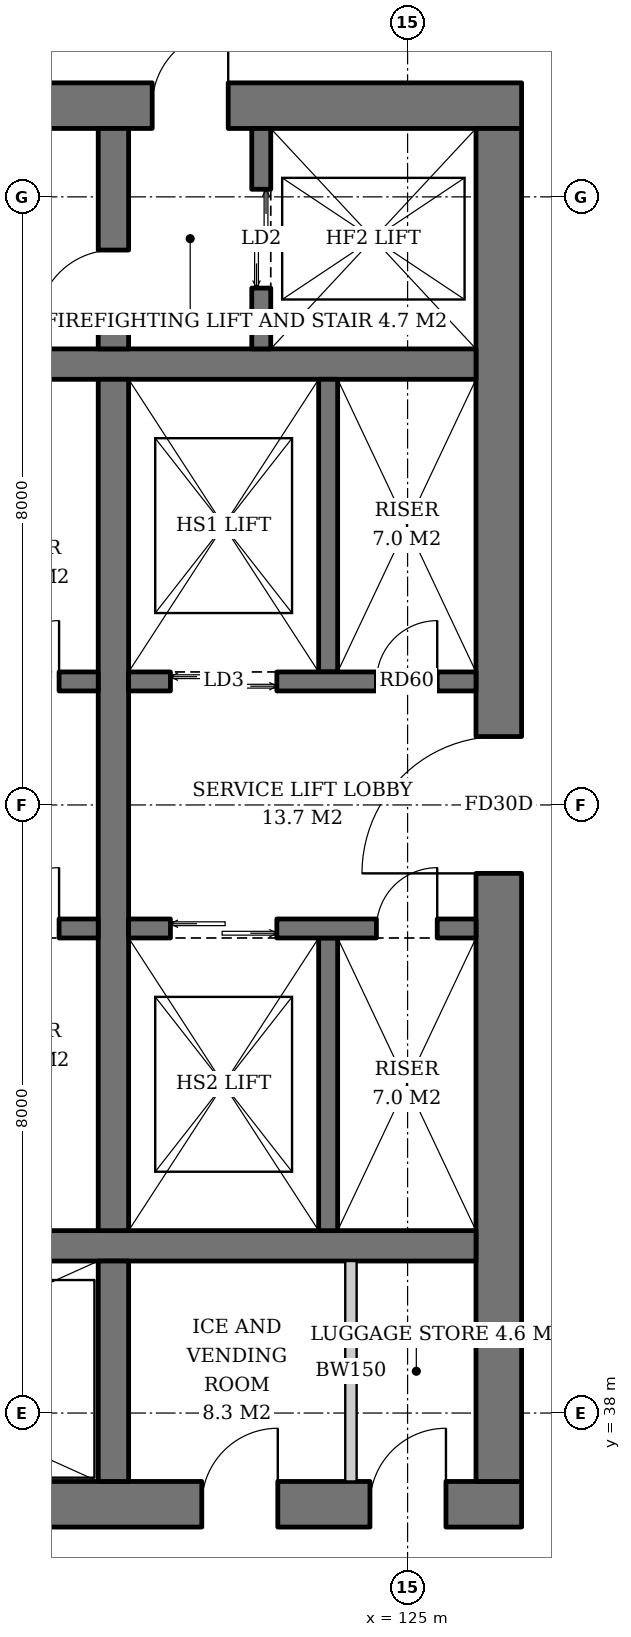
"""IFC4 building model, lengths in metres.
Left out: names, types, materials, properties, quantities, classifications, styles, units other than length and angle.
Written with IfcOpenShell. Run it as: python <this file> out.ifc"""

import sys

from ifc_helpers import new_model, si_unit, direction, frame, frame_2d, origin, place, context, subcontext, project, spatial, rectangle, extrude, element, fill, save


model = new_model("IFC4")
c1 = context("Model", 3, precision=1e-05, world=origin(), true_north=direction((0.0, 1.0)))
c2 = subcontext(c1, "Body", "Model", "MODEL_VIEW")
j1 = project(units=[si_unit("LENGTHUNIT", "METRE"), si_unit("PLANEANGLEUNIT", "RADIAN")], contexts=[c1])
p1 = place(None, origin())
s1 = spatial("IfcSite", under=j1, at=p1, CompositionType="ELEMENT")
p2 = place(p1, origin())
s2 = spatial("IfcBuilding", under=s1, at=p2, CompositionType="ELEMENT")
p3 = place(p2, frame((0.0, 0.0, 43.8)))
s3 = spatial("IfcBuildingStorey", under=s2, at=p3, CompositionType="ELEMENT", Elevation=43.8)
p4 = place(p3, frame((107.5, 36.8, 0.0), z_axis=(0.0, 0.0, 1.0), x_axis=(1.0, 0.0, 0.0)))
e1 = element("IfcWall", 1, at=p4, inside=s3, PredefinedType="SHEAR", context=c2, shape_type="SweptSolid", body=[
    extrude(rectangle(XDim=19.0, YDim=0.6, at=frame_2d((9.5, 0.0))), origin(), (0.0, 0.0, 1.0), 3.8),
])
p5 = place(p4, frame((3.9, 0.0, 0.0)))
e2 = element("IfcOpeningElement", 2, at=p5, cuts=e1, PredefinedType="OPENING", context=c2, shape_type="SweptSolid", body=[
    extrude(rectangle(XDim=1.0, YDim=2.1, at=frame_2d((0.5, 1.05))), frame((0.0, 0.31, 0.0), z_axis=(0.0, -1.0, 0.0), x_axis=(1.0, 0.0, 0.0)), (0.0, 0.0, 1.0), 0.62),
])
p6 = place(p4, frame((14.792, 0.0, 0.0)))
e3 = element("IfcOpeningElement", 3, at=p6, cuts=e1, PredefinedType="OPENING", context=c2, shape_type="SweptSolid", body=[
    extrude(rectangle(XDim=1.0, YDim=2.1, at=frame_2d((0.5, 1.05))), frame((0.0, 0.31, 0.0), z_axis=(0.0, -1.0, 0.0), x_axis=(1.0, 0.0, 0.0)), (0.0, 0.0, 1.0), 0.62),
])
p7 = place(p4, frame((17.005, 0.0, 0.0)))
e4 = element("IfcOpeningElement", 4, at=p7, cuts=e1, PredefinedType="OPENING", context=c2, shape_type="SweptSolid", body=[
    extrude(rectangle(XDim=1.0, YDim=2.1, at=frame_2d((0.5, 1.05))), frame((0.0, 0.31, 0.0), z_axis=(0.0, -1.0, 0.0), x_axis=(1.0, 0.0, 0.0)), (0.0, 0.0, 1.0), 0.62),
])
p8 = place(p3, frame((107.5, 55.2, 0.0), z_axis=(0.0, 0.0, 1.0), x_axis=(1.0, 0.0, 0.0)))
e5 = element("IfcWall", 5, at=p8, inside=s3, PredefinedType="SHEAR", context=c2, shape_type="SweptSolid", body=[
    extrude(rectangle(XDim=19.0, YDim=0.6, at=frame_2d((9.5, 0.0))), origin(), (0.0, 0.0, 1.0), 3.8),
])
p9 = place(p8, frame((14.14, 0.0, 0.0)))
e6 = element("IfcOpeningElement", 6, at=p9, cuts=e5, PredefinedType="OPENING", context=c2, shape_type="SweptSolid", body=[
    extrude(rectangle(XDim=1.0, YDim=2.1, at=frame_2d((0.5, 1.05))), frame((0.0, 0.31, 0.0), z_axis=(0.0, -1.0, 0.0), x_axis=(1.0, 0.0, 0.0)), (0.0, 0.0, 1.0), 0.62),
])
p10 = place(p8, frame((2.425, 0.0, 0.0)))
e7 = element("IfcOpeningElement", 7, at=p10, cuts=e5, PredefinedType="OPENING", context=c2, shape_type="SweptSolid", body=[
    extrude(rectangle(XDim=1.0, YDim=2.1, at=frame_2d((0.5, 1.05))), frame((0.0, 0.31, 0.0), z_axis=(0.0, -1.0, 0.0), x_axis=(1.0, 0.0, 0.0)), (0.0, 0.0, 1.0), 0.62),
])
p11 = place(p3, frame((126.2, 37.1, 0.0), z_axis=(0.0, 0.0, 1.0), x_axis=(0.0, 1.0, 0.0)))
e8 = element("IfcWall", 8, at=p11, inside=s3, PredefinedType="SHEAR", context=c2, shape_type="SweptSolid", body=[
    extrude(rectangle(XDim=17.8, YDim=0.6, at=frame_2d((8.9, 0.0))), origin(), (0.0, 0.0, 1.0), 3.8),
])
p12 = place(p11, frame((8.0, 0.0, 0.0)))
e9 = element("IfcOpeningElement", 9, at=p12, cuts=e8, PredefinedType="OPENING", context=c2, shape_type="SweptSolid", body=[
    extrude(rectangle(XDim=1.8, YDim=2.4, at=frame_2d((0.9, 1.2))), frame((0.0, 0.31, 0.0), z_axis=(0.0, -1.0, 0.0), x_axis=(1.0, 0.0, 0.0)), (0.0, 0.0, 1.0), 0.62),
])
for number, where, z_axis, x_axis in (
    (10, (108.1, 40.2, 0.0), (0.0, 0.0, 1.0), (1.0, 0.0, 0.0)),
    (11, (108.1, 51.8, 0.0), (0.0, 0.0, 1.0), (1.0, 0.0, 0.0)),
):
    element("IfcWall", number, at=place(p3, frame(where, z_axis=z_axis, x_axis=x_axis)), inside=s3, PredefinedType="SHEAR", context=c2, shape_type="SweptSolid", body=[
        extrude(rectangle(XDim=17.8, YDim=0.4, at=frame_2d((8.9, 0.0))), origin(), (0.0, 0.0, 1.0), 3.8),
    ])
p13 = place(p3, frame((121.13, 37.1, 0.0), z_axis=(0.0, 0.0, 1.0), x_axis=(0.0, 1.0, 0.0)))
e12 = element("IfcWall", 12, at=p13, inside=s3, PredefinedType="SHEAR", context=c2, shape_type="SweptSolid", body=[
    extrude(rectangle(XDim=2.9, YDim=0.4, at=frame_2d((1.45, 0.0))), origin(), (0.0, 0.0, 1.0), 3.8),
])
p14 = place(p3, frame((121.13, 40.4, 0.0), z_axis=(0.0, 0.0, 1.0), x_axis=(0.0, 1.0, 0.0)))
e13 = element("IfcWall", 13, at=p14, inside=s3, PredefinedType="SHEAR", context=c2, shape_type="SweptSolid", body=[
    extrude(rectangle(XDim=11.2, YDim=0.4, at=frame_2d((5.6, 0.0))), origin(), (0.0, 0.0, 1.0), 3.8),
])
p15 = place(p3, frame((121.13, 52.0, 0.0), z_axis=(0.0, 0.0, 1.0), x_axis=(0.0, 1.0, 0.0)))
e14 = element("IfcWall", 14, at=p15, inside=s3, PredefinedType="SHEAR", context=c2, shape_type="SweptSolid", body=[
    extrude(rectangle(XDim=2.9, YDim=0.4, at=frame_2d((1.45, 0.0))), origin(), (0.0, 0.0, 1.0), 3.8),
])
p16 = place(p15, frame((0.3, 0.0, 0.0)))
e15 = element("IfcOpeningElement", 15, at=p16, cuts=e14, PredefinedType="OPENING", context=c2, shape_type="SweptSolid", body=[
    extrude(rectangle(XDim=1.0, YDim=2.1, at=frame_2d((0.5, 1.05))), frame((0.0, 0.21, 0.0), z_axis=(0.0, -1.0, 0.0), x_axis=(1.0, 0.0, 0.0)), (0.0, 0.0, 1.0), 0.42),
])
p17 = place(p3, frame((123.075, 52.0, 0.0), z_axis=(0.0, 0.0, 1.0), x_axis=(0.0, 1.0, 0.0)))
e16 = element("IfcWall", 16, at=p17, inside=s3, PredefinedType="SHEAR", context=c2, shape_type="SweptSolid", body=[
    extrude(rectangle(XDim=2.9, YDim=0.25, at=frame_2d((1.45, 0.0))), origin(), (0.0, 0.0, 1.0), 3.8),
])
p18 = place(p17, frame((0.8, 0.0, 0.0)))
e17 = element("IfcOpeningElement", 17, at=p18, cuts=e16, PredefinedType="OPENING", context=c2, shape_type="SweptSolid", body=[
    extrude(rectangle(XDim=1.3, YDim=2.2, at=frame_2d((0.65, 1.1))), frame((0.0, 0.135, 0.0), z_axis=(0.0, -1.0, 0.0), x_axis=(1.0, 0.0, 0.0)), (0.0, 0.0, 1.0), 0.27),
])
p19 = place(p3, frame((108.1, 47.625, 0.0), z_axis=(0.0, 0.0, 1.0), x_axis=(1.0, 0.0, 0.0)))
e18 = element("IfcWall", 18, at=p19, inside=s3, PredefinedType="SHEAR", context=c2, shape_type="SweptSolid", body=[
    extrude(rectangle(XDim=12.83, YDim=0.25, at=frame_2d((6.415, 0.0))), origin(), (0.0, 0.0, 1.0), 3.8),
])
p20 = place(p19, frame((0.7, 0.0, 0.0)))
e19 = element("IfcOpeningElement", 19, at=p20, cuts=e18, PredefinedType="OPENING", context=c2, shape_type="SweptSolid", body=[
    extrude(rectangle(XDim=1.1, YDim=2.2, at=frame_2d((0.55, 1.1))), frame((0.0, 0.135, 0.0), z_axis=(0.0, -1.0, 0.0), x_axis=(1.0, 0.0, 0.0)), (0.0, 0.0, 1.0), 0.27),
])
p21 = place(p19, frame((3.45, 0.0, 0.0)))
e20 = element("IfcOpeningElement", 20, at=p21, cuts=e18, PredefinedType="OPENING", context=c2, shape_type="SweptSolid", body=[
    extrude(rectangle(XDim=1.1, YDim=2.2, at=frame_2d((0.55, 1.1))), frame((0.0, 0.135, 0.0), z_axis=(0.0, -1.0, 0.0), x_axis=(1.0, 0.0, 0.0)), (0.0, 0.0, 1.0), 0.27),
])
p22 = place(p19, frame((6.2, 0.0, 0.0)))
e21 = element("IfcOpeningElement", 21, at=p22, cuts=e18, PredefinedType="OPENING", context=c2, shape_type="SweptSolid", body=[
    extrude(rectangle(XDim=1.1, YDim=2.2, at=frame_2d((0.55, 1.1))), frame((0.0, 0.135, 0.0), z_axis=(0.0, -1.0, 0.0), x_axis=(1.0, 0.0, 0.0)), (0.0, 0.0, 1.0), 0.27),
])
p23 = place(p19, frame((8.95, 0.0, 0.0)))
e22 = element("IfcOpeningElement", 22, at=p23, cuts=e18, PredefinedType="OPENING", context=c2, shape_type="SweptSolid", body=[
    extrude(rectangle(XDim=1.1, YDim=2.2, at=frame_2d((0.55, 1.1))), frame((0.0, 0.135, 0.0), z_axis=(0.0, -1.0, 0.0), x_axis=(1.0, 0.0, 0.0)), (0.0, 0.0, 1.0), 0.27),
])
p24 = place(p19, frame((11.515, 0.0, 0.0)))
e23 = element("IfcOpeningElement", 23, at=p24, cuts=e18, PredefinedType="OPENING", context=c2, shape_type="SweptSolid", body=[
    extrude(rectangle(XDim=0.8, YDim=2.0, at=frame_2d((0.4, 1.0))), frame((0.0, 0.135, 0.0), z_axis=(0.0, -1.0, 0.0), x_axis=(1.0, 0.0, 0.0)), (0.0, 0.0, 1.0), 0.27),
])
p25 = place(p3, frame((108.1, 44.375, 0.0), z_axis=(0.0, 0.0, 1.0), x_axis=(1.0, 0.0, 0.0)))
e24 = element("IfcWall", 24, at=p25, inside=s3, PredefinedType="SHEAR", context=c2, shape_type="SweptSolid", body=[
    extrude(rectangle(XDim=12.83, YDim=0.25, at=frame_2d((6.415, 0.0))), origin(), (0.0, 0.0, 1.0), 3.8),
])
p26 = place(p25, frame((0.7, 0.0, 0.0)))
e25 = element("IfcOpeningElement", 25, at=p26, cuts=e24, PredefinedType="OPENING", context=c2, shape_type="SweptSolid", body=[
    extrude(rectangle(XDim=1.1, YDim=2.2, at=frame_2d((0.55, 1.1))), frame((0.0, 0.135, 0.0), z_axis=(0.0, -1.0, 0.0), x_axis=(1.0, 0.0, 0.0)), (0.0, 0.0, 1.0), 0.27),
])
p27 = place(p25, frame((3.45, 0.0, 0.0)))
e26 = element("IfcOpeningElement", 26, at=p27, cuts=e24, PredefinedType="OPENING", context=c2, shape_type="SweptSolid", body=[
    extrude(rectangle(XDim=1.1, YDim=2.2, at=frame_2d((0.55, 1.1))), frame((0.0, 0.135, 0.0), z_axis=(0.0, -1.0, 0.0), x_axis=(1.0, 0.0, 0.0)), (0.0, 0.0, 1.0), 0.27),
])
p28 = place(p25, frame((6.2, 0.0, 0.0)))
e27 = element("IfcOpeningElement", 27, at=p28, cuts=e24, PredefinedType="OPENING", context=c2, shape_type="SweptSolid", body=[
    extrude(rectangle(XDim=1.1, YDim=2.2, at=frame_2d((0.55, 1.1))), frame((0.0, 0.135, 0.0), z_axis=(0.0, -1.0, 0.0), x_axis=(1.0, 0.0, 0.0)), (0.0, 0.0, 1.0), 0.27),
])
p29 = place(p25, frame((9.0, 0.0, 0.0)))
e28 = element("IfcOpeningElement", 28, at=p29, cuts=e24, PredefinedType="OPENING", context=c2, shape_type="SweptSolid", body=[
    extrude(rectangle(XDim=1.0, YDim=2.1, at=frame_2d((0.5, 1.05))), frame((0.0, 0.135, 0.0), z_axis=(0.0, -1.0, 0.0), x_axis=(1.0, 0.0, 0.0)), (0.0, 0.0, 1.0), 0.27),
])
p30 = place(p25, frame((11.515, 0.0, 0.0)))
e29 = element("IfcOpeningElement", 29, at=p30, cuts=e24, PredefinedType="OPENING", context=c2, shape_type="SweptSolid", body=[
    extrude(rectangle(XDim=0.8, YDim=2.0, at=frame_2d((0.4, 1.0))), frame((0.0, 0.135, 0.0), z_axis=(0.0, -1.0, 0.0), x_axis=(1.0, 0.0, 0.0)), (0.0, 0.0, 1.0), 0.27),
])
p31 = place(p3, frame((123.955, 47.75, 0.0), z_axis=(0.0, 0.0, 1.0), x_axis=(0.0, 1.0, 0.0)))
e30 = element("IfcWall", 30, at=p31, inside=s3, PredefinedType="SHEAR", context=c2, shape_type="SweptSolid", body=[
    extrude(rectangle(XDim=3.85, YDim=0.25, at=frame_2d((1.925, 0.0))), origin(), (0.0, 0.0, 1.0), 3.8),
])
p32 = place(p3, frame((121.33, 47.625, 0.0), z_axis=(0.0, 0.0, 1.0), x_axis=(1.0, 0.0, 0.0)))
e31 = element("IfcWall", 31, at=p32, inside=s3, PredefinedType="SHEAR", context=c2, shape_type="SweptSolid", body=[
    extrude(rectangle(XDim=4.57, YDim=0.25, at=frame_2d((2.285, 0.0))), origin(), (0.0, 0.0, 1.0), 3.8),
])
p33 = place(p32, frame((0.55, 0.0, 0.0)))
e32 = element("IfcOpeningElement", 32, at=p33, cuts=e31, PredefinedType="OPENING", context=c2, shape_type="SweptSolid", body=[
    extrude(rectangle(XDim=1.4, YDim=2.4, at=frame_2d((0.7, 1.2))), frame((0.0, 0.135, 0.0), z_axis=(0.0, -1.0, 0.0), x_axis=(1.0, 0.0, 0.0)), (0.0, 0.0, 1.0), 0.27),
])
p34 = place(p32, frame((3.26, 0.0, 0.0)))
e33 = element("IfcOpeningElement", 33, at=p34, cuts=e31, PredefinedType="OPENING", context=c2, shape_type="SweptSolid", body=[
    extrude(rectangle(XDim=0.8, YDim=2.0, at=frame_2d((0.4, 1.0))), frame((0.0, 0.135, 0.0), z_axis=(0.0, -1.0, 0.0), x_axis=(1.0, 0.0, 0.0)), (0.0, 0.0, 1.0), 0.27),
])
p35 = place(p3, frame((123.955, 44.25, 0.0), z_axis=(0.0, 0.0, 1.0), x_axis=(0.0, -1.0, 0.0)))
e34 = element("IfcWall", 34, at=p35, inside=s3, PredefinedType="SHEAR", context=c2, shape_type="SweptSolid", body=[
    extrude(rectangle(XDim=3.85, YDim=0.25, at=frame_2d((1.925, 0.0))), origin(), (0.0, 0.0, 1.0), 3.8),
])
p36 = place(p3, frame((121.33, 44.375, 0.0), z_axis=(0.0, 0.0, 1.0), x_axis=(1.0, 0.0, 0.0)))
e35 = element("IfcWall", 35, at=p36, inside=s3, PredefinedType="SHEAR", context=c2, shape_type="SweptSolid", body=[
    extrude(rectangle(XDim=4.57, YDim=0.25, at=frame_2d((2.285, 0.0))), origin(), (0.0, 0.0, 1.0), 3.8),
])
p37 = place(p36, frame((0.55, 0.0, 0.0)))
e36 = element("IfcOpeningElement", 36, at=p37, cuts=e35, PredefinedType="OPENING", context=c2, shape_type="SweptSolid", body=[
    extrude(rectangle(XDim=1.4, YDim=2.4, at=frame_2d((0.7, 1.2))), frame((0.0, 0.135, 0.0), z_axis=(0.0, -1.0, 0.0), x_axis=(1.0, 0.0, 0.0)), (0.0, 0.0, 1.0), 0.27),
])
p38 = place(p36, frame((3.26, 0.0, 0.0)))
e37 = element("IfcOpeningElement", 37, at=p38, cuts=e35, PredefinedType="OPENING", context=c2, shape_type="SweptSolid", body=[
    extrude(rectangle(XDim=0.8, YDim=2.0, at=frame_2d((0.4, 1.0))), frame((0.0, 0.135, 0.0), z_axis=(0.0, -1.0, 0.0), x_axis=(1.0, 0.0, 0.0)), (0.0, 0.0, 1.0), 0.27),
])
p39 = place(p3, frame((124.255, 37.1, 0.0), z_axis=(0.0, 0.0, 1.0), x_axis=(0.0, 1.0, 0.0)))
e38 = element("IfcWall", 38, at=p39, inside=s3, PredefinedType="SOLIDWALL", context=c2, shape_type="SweptSolid", body=[
    extrude(rectangle(XDim=2.9, YDim=0.15, at=frame_2d((1.45, 0.0))), origin(), (0.0, 0.0, 1.0), 3.6),
])
p40 = place(p18, origin())
e39 = element("IfcDoor", 39, at=p40, inside=s3, OperationType="DOUBLE_DOOR_SLIDING", PredefinedType="DOOR", context=c2, shape_type="SweptSolid", body=[
    extrude(rectangle(XDim=1.3, YDim=2.2, at=frame_2d((0.65, 1.1))), frame((0.0, 0.025, 0.0), z_axis=(0.0, -1.0, 0.0), x_axis=(1.0, 0.0, 0.0)), (0.0, 0.0, 1.0), 0.05),
])
fill(e17, e39)
p41 = place(p24, origin())
e40 = element("IfcDoor", 40, at=p41, inside=s3, OperationType="SINGLE_SWING_RIGHT", PredefinedType="DOOR", context=c2, shape_type="SweptSolid", body=[
    extrude(rectangle(XDim=0.8, YDim=2.0, at=frame_2d((0.4, 1.0))), frame((0.0, 0.025, 0.0), z_axis=(0.0, -1.0, 0.0), x_axis=(1.0, 0.0, 0.0)), (0.0, 0.0, 1.0), 0.05),
])
fill(e23, e40)
p42 = place(p30, origin())
e41 = element("IfcDoor", 41, at=p42, inside=s3, OperationType="SINGLE_SWING_RIGHT", PredefinedType="DOOR", context=c2, shape_type="SweptSolid", body=[
    extrude(rectangle(XDim=0.8, YDim=2.0, at=frame_2d((0.4, 1.0))), frame((0.0, 0.025, 0.0), z_axis=(0.0, -1.0, 0.0), x_axis=(1.0, 0.0, 0.0)), (0.0, 0.0, 1.0), 0.05),
])
fill(e29, e41)
p43 = place(p33, origin())
e42 = element("IfcDoor", 42, at=p43, inside=s3, OperationType="DOUBLE_DOOR_SLIDING", PredefinedType="DOOR", context=c2, shape_type="SweptSolid", body=[
    extrude(rectangle(XDim=1.4, YDim=2.4, at=frame_2d((0.7, 1.2))), frame((0.0, 0.025, 0.0), z_axis=(0.0, -1.0, 0.0), x_axis=(1.0, 0.0, 0.0)), (0.0, 0.0, 1.0), 0.05),
])
fill(e32, e42)
p44 = place(p34, origin())
e43 = element("IfcDoor", 43, at=p44, inside=s3, OperationType="SINGLE_SWING_RIGHT", PredefinedType="DOOR", context=c2, shape_type="SweptSolid", body=[
    extrude(rectangle(XDim=0.8, YDim=2.0, at=frame_2d((0.4, 1.0))), frame((0.0, 0.025, 0.0), z_axis=(0.0, -1.0, 0.0), x_axis=(1.0, 0.0, 0.0)), (0.0, 0.0, 1.0), 0.05),
])
fill(e33, e43)
p45 = place(p37, origin())
e44 = element("IfcDoor", 44, at=p45, inside=s3, OperationType="DOUBLE_DOOR_SLIDING", PredefinedType="DOOR", context=c2, shape_type="SweptSolid", body=[
    extrude(rectangle(XDim=1.4, YDim=2.4, at=frame_2d((0.7, 1.2))), frame((0.0, 0.025, 0.0), z_axis=(0.0, -1.0, 0.0), x_axis=(1.0, 0.0, 0.0)), (0.0, 0.0, 1.0), 0.05),
])
fill(e36, e44)
p46 = place(p38, origin())
e45 = element("IfcDoor", 45, at=p46, inside=s3, OperationType="SINGLE_SWING_RIGHT", PredefinedType="DOOR", context=c2, shape_type="SweptSolid", body=[
    extrude(rectangle(XDim=0.8, YDim=2.0, at=frame_2d((0.4, 1.0))), frame((0.0, 0.025, 0.0), z_axis=(0.0, -1.0, 0.0), x_axis=(1.0, 0.0, 0.0)), (0.0, 0.0, 1.0), 0.05),
])
fill(e37, e45)
p47 = place(p16, origin())
e46 = element("IfcDoor", 46, at=p47, inside=s3, OperationType="SINGLE_SWING_LEFT", PredefinedType="DOOR", context=c2, shape_type="SweptSolid", body=[
    extrude(rectangle(XDim=1.0, YDim=2.1, at=frame_2d((0.5, 1.05))), frame((0.0, 0.025, 0.0), z_axis=(0.0, -1.0, 0.0), x_axis=(1.0, 0.0, 0.0)), (0.0, 0.0, 1.0), 0.05),
])
fill(e15, e46)
p48 = place(p9, origin())
e47 = element("IfcDoor", 47, at=p48, inside=s3, OperationType="SINGLE_SWING_RIGHT", PredefinedType="DOOR", context=c2, shape_type="SweptSolid", body=[
    extrude(rectangle(XDim=1.0, YDim=2.1, at=frame_2d((0.5, 1.05))), frame((0.0, 0.025, 0.0), z_axis=(0.0, -1.0, 0.0), x_axis=(1.0, 0.0, 0.0)), (0.0, 0.0, 1.0), 0.05),
])
fill(e6, e47)
p49 = place(p12, origin())
e48 = element("IfcDoor", 48, at=p49, inside=s3, OperationType="DOUBLE_DOOR_SINGLE_SWING", PredefinedType="DOOR", context=c2, shape_type="SweptSolid", body=[
    extrude(rectangle(XDim=1.8, YDim=2.4, at=frame_2d((0.9, 1.2))), frame((0.0, 0.025, 0.0), z_axis=(0.0, -1.0, 0.0), x_axis=(1.0, 0.0, 0.0)), (0.0, 0.0, 1.0), 0.05),
])
fill(e9, e48)
p50 = place(p6, origin())
e49 = element("IfcDoor", 49, at=p50, inside=s3, OperationType="SINGLE_SWING_RIGHT", PredefinedType="DOOR", context=c2, shape_type="SweptSolid", body=[
    extrude(rectangle(XDim=1.0, YDim=2.1, at=frame_2d((0.5, 1.05))), frame((0.0, 0.29, 0.0), z_axis=(0.0, -1.0, 0.0), x_axis=(1.0, 0.0, 0.0)), (0.0, 0.0, 1.0), 0.05),
])
fill(e3, e49)
p51 = place(p7, origin())
e50 = element("IfcDoor", 50, at=p51, inside=s3, OperationType="SINGLE_SWING_RIGHT", PredefinedType="DOOR", context=c2, shape_type="SweptSolid", body=[
    extrude(rectangle(XDim=1.0, YDim=2.1, at=frame_2d((0.5, 1.05))), frame((0.0, 0.29, 0.0), z_axis=(0.0, -1.0, 0.0), x_axis=(1.0, 0.0, 0.0)), (0.0, 0.0, 1.0), 0.05),
])
fill(e4, e50)
save(model, sys.argv[1])
